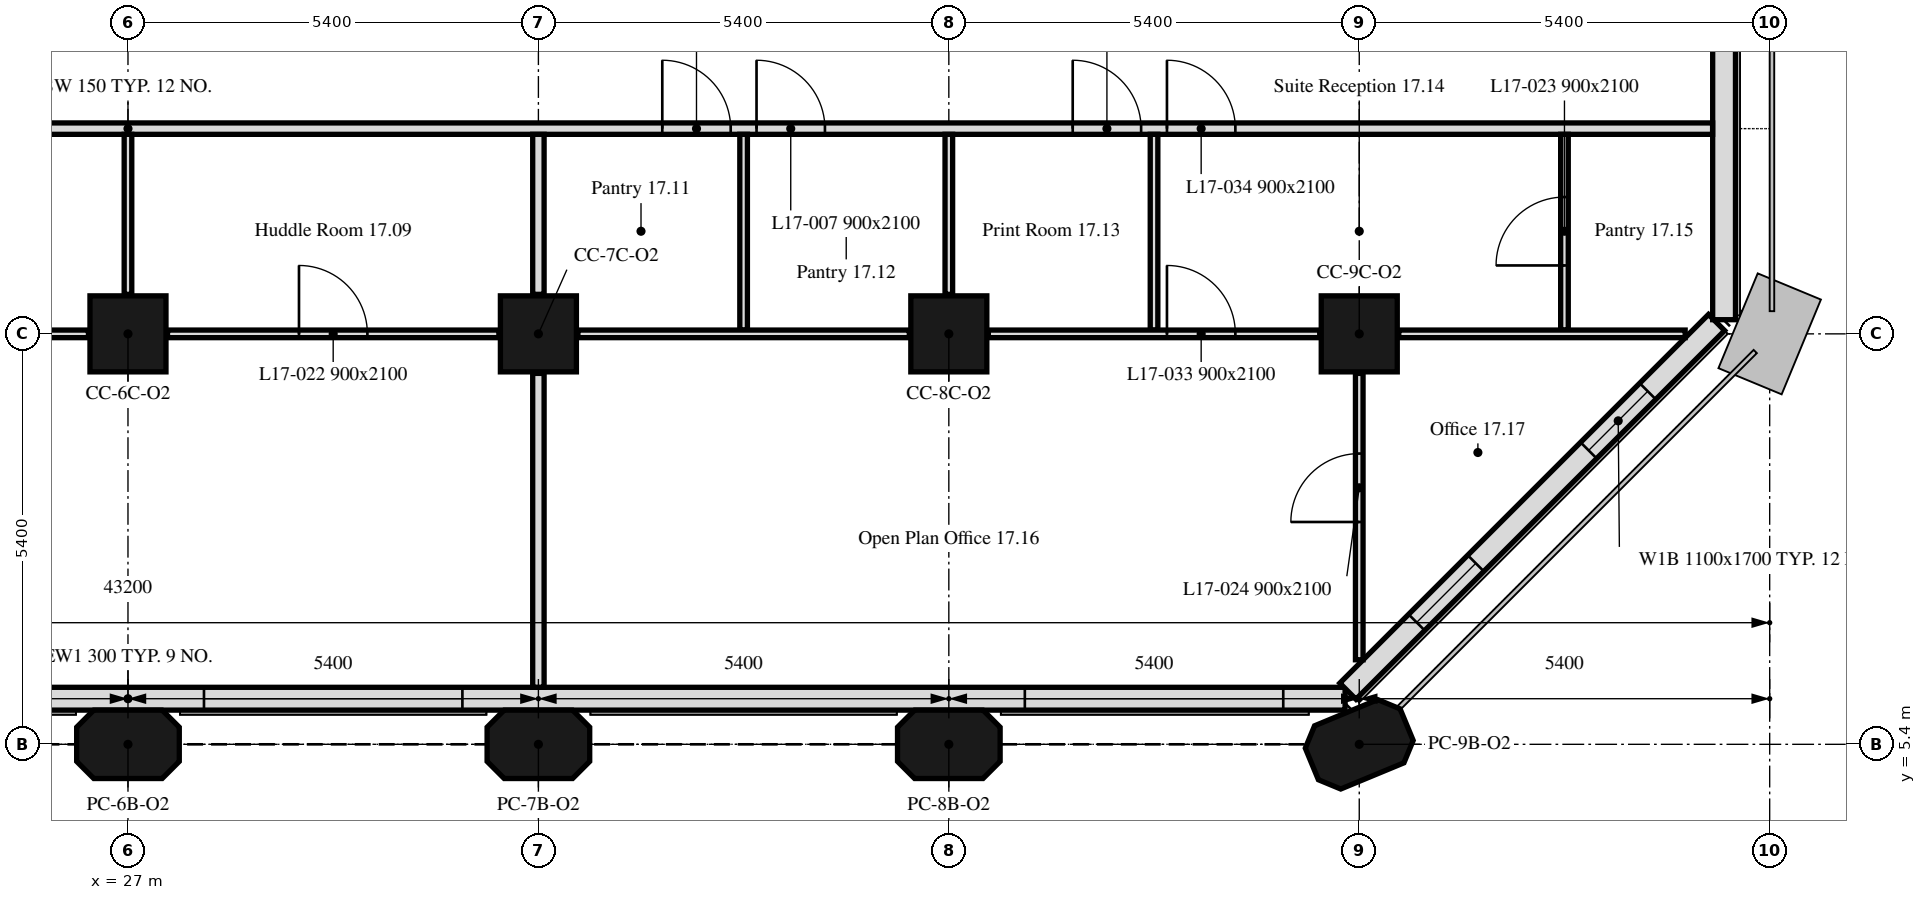
"""IFC4 building model, lengths in metres.
Left out: names, types, materials, properties, quantities, classifications, styles, units other than length and angle.
Written with IfcOpenShell. Run it as: python <this file> out.ifc"""

import sys

from ifc_helpers import new_model, si_unit, direction, frame, frame_2d, origin, origin_2d, place, context, subcontext, project, spatial, polyline, rectangle, outline, extrude, element, fill, save


model = new_model("IFC4")
c1 = context("Model", 3, precision=1e-05, world=origin(), true_north=direction((0.0, 1.0)))
c2 = subcontext(c1, "Body", "Model", "MODEL_VIEW")
j1 = project(units=[si_unit("LENGTHUNIT", "METRE"), si_unit("PLANEANGLEUNIT", "RADIAN")], contexts=[c1])
p1 = place(None, origin())
s1 = spatial("IfcSite", under=j1, at=p1, CompositionType="ELEMENT")
p2 = place(p1, origin())
s2 = spatial("IfcBuilding", under=s1, at=p2, CompositionType="ELEMENT")
p3 = place(p2, frame((0.0, 0.0, 76.4)))
s3 = spatial("IfcBuildingStorey", under=s2, at=p3, CompositionType="ELEMENT", Elevation=76.4)
for number, where, z_axis, x_axis in (
    (1, (27.0, 5.4, 0.0), (0.0, 0.0, 1.0), (1.0, 0.0, 0.0)),
    (2, (32.4, 5.4, 0.0), (0.0, 0.0, 1.0), (1.0, 0.0, 0.0)),
    (3, (37.8, 5.4, 0.0), (0.0, 0.0, 1.0), (1.0, 0.0, 0.0)),
    (4, (43.2, 5.4, 0.0), (0.0, 0.0, 1.0), (0.924, 0.383, 0.0)),
):
    element("IfcColumn", number, at=place(p3, frame(where, z_axis=z_axis, x_axis=x_axis)), inside=s3, PredefinedType="COLUMN", context=c2, shape_type="SweptSolid", body=[
        extrude(outline(polyline([(-0.45, -0.45), (0.45, -0.45), (0.675, -0.225), (0.675, 0.225), (0.45, 0.45), (-0.45, 0.45), (-0.675, 0.225), (-0.675, -0.225), (-0.45, -0.45)])), origin(), (0.0, 0.0, 1.0), 3.5),
    ])
for number, where, z_axis, x_axis in (
    (5, (27.0, 10.8, 0.0), (0.0, 0.0, 1.0), (1.0, 0.0, 0.0)),
    (6, (32.4, 10.8, 0.0), (0.0, 0.0, 1.0), (1.0, 0.0, 0.0)),
    (7, (37.8, 10.8, 0.0), (0.0, 0.0, 1.0), (1.0, 0.0, 0.0)),
    (8, (43.2, 10.8, 0.0), (0.0, 0.0, 1.0), (1.0, 0.0, 0.0)),
):
    element("IfcColumn", number, at=place(p3, frame(where, z_axis=z_axis, x_axis=x_axis)), inside=s3, PredefinedType="COLUMN", context=c2, shape_type="SweptSolid", body=[
        extrude(rectangle(XDim=1.0, YDim=1.0, at=origin_2d()), origin(), (0.0, 0.0, 1.0), 3.5),
    ])
p4 = place(p3, frame((10.986, 6.0, 0.0), z_axis=(0.0, 0.0, 1.0), x_axis=(1.0, 0.0, 0.0)))
e9 = element("IfcWall", 9, at=p4, inside=s3, PredefinedType="SOLIDWALL", context=c2, shape_type="SweptSolid", body=[
    extrude(rectangle(XDim=32.027, YDim=0.3, at=frame_2d((16.014, 0.0))), origin(), (0.0, 0.0, 1.0), 3.5),
])
p5 = place(p4, frame((6.214, 0.0, 0.9)))
e10 = element("IfcOpeningElement", 10, at=p5, cuts=e9, PredefinedType="OPENING", context=c2, shape_type="SweptSolid", body=[
    extrude(rectangle(XDim=3.4, YDim=1.7, at=frame_2d((1.7, 0.85))), frame((0.0, 0.16, 0.0), z_axis=(0.0, -1.0, 0.0), x_axis=(1.0, 0.0, 0.0)), (0.0, 0.0, 1.0), 0.32),
])
p6 = place(p4, frame((17.014, 0.0, 0.9)))
e11 = element("IfcOpeningElement", 11, at=p6, cuts=e9, PredefinedType="OPENING", context=c2, shape_type="SweptSolid", body=[
    extrude(rectangle(XDim=3.4, YDim=1.7, at=frame_2d((1.7, 0.85))), frame((0.0, 0.16, 0.0), z_axis=(0.0, -1.0, 0.0), x_axis=(1.0, 0.0, 0.0)), (0.0, 0.0, 1.0), 0.32),
])
p7 = place(p4, frame((27.814, 0.0, 0.9)))
e12 = element("IfcOpeningElement", 12, at=p7, cuts=e9, PredefinedType="OPENING", context=c2, shape_type="SweptSolid", body=[
    extrude(rectangle(XDim=3.4, YDim=1.7, at=frame_2d((1.7, 0.85))), frame((0.0, 0.16, 0.0), z_axis=(0.0, -1.0, 0.0), x_axis=(1.0, 0.0, 0.0)), (0.0, 0.0, 1.0), 0.32),
])
p8 = place(p3, frame((43.051, 6.099, 0.0), z_axis=(0.0, 0.0, 1.0), x_axis=(0.707106781187, 0.707106781187, 0.0)))
e13 = element("IfcWall", 13, at=p8, inside=s3, PredefinedType="SOLIDWALL", context=c2, shape_type="SweptSolid", body=[
    extrude(rectangle(XDim=6.86, YDim=0.3, at=frame_2d((3.43, 0.0))), origin(), (0.0, 0.0, 1.0), 3.5),
])
p9 = place(p8, frame((1.28, 0.0, 0.9)))
e14 = element("IfcOpeningElement", 14, at=p9, cuts=e13, PredefinedType="OPENING", context=c2, shape_type="SweptSolid", body=[
    extrude(rectangle(XDim=1.1, YDim=1.7, at=frame_2d((0.55, 0.85))), frame((0.0, 0.16, 0.0), z_axis=(0.0, -1.0, 0.0), x_axis=(1.0, 0.0, 0.0)), (0.0, 0.0, 1.0), 0.32),
])
p10 = place(p8, frame((4.48, 0.0, 0.9)))
e15 = element("IfcOpeningElement", 15, at=p10, cuts=e13, PredefinedType="OPENING", context=c2, shape_type="SweptSolid", body=[
    extrude(rectangle(XDim=1.1, YDim=1.7, at=frame_2d((0.55, 0.85))), frame((0.0, 0.16, 0.0), z_axis=(0.0, -1.0, 0.0), x_axis=(1.0, 0.0, 0.0)), (0.0, 0.0, 1.0), 0.32),
])
p11 = place(p3, frame((48.0, 10.986, 0.0), z_axis=(0.0, 0.0, 1.0), x_axis=(0.0, 1.0, 0.0)))
e16 = element("IfcWall", 16, at=p11, inside=s3, PredefinedType="SOLIDWALL", context=c2, shape_type="SweptSolid", body=[
    extrude(rectangle(XDim=32.027, YDim=0.3, at=frame_2d((16.014, 0.0))), origin(), (0.0, 0.0, 1.0), 3.5),
])
p12 = place(p11, frame((6.214, 0.0, 0.9)))
e17 = element("IfcOpeningElement", 17, at=p12, cuts=e16, PredefinedType="OPENING", context=c2, shape_type="SweptSolid", body=[
    extrude(rectangle(XDim=3.4, YDim=1.7, at=frame_2d((1.7, 0.85))), frame((0.0, 0.16, 0.0), z_axis=(0.0, -1.0, 0.0), x_axis=(1.0, 0.0, 0.0)), (0.0, 0.0, 1.0), 0.32),
])
p13 = place(p11, frame((17.014, 0.0, 0.9)))
e18 = element("IfcOpeningElement", 18, at=p13, cuts=e16, PredefinedType="OPENING", context=c2, shape_type="SweptSolid", body=[
    extrude(rectangle(XDim=3.4, YDim=1.7, at=frame_2d((1.7, 0.85))), frame((0.0, 0.16, 0.0), z_axis=(0.0, -1.0, 0.0), x_axis=(1.0, 0.0, 0.0)), (0.0, 0.0, 1.0), 0.32),
])
p14 = place(p11, frame((27.814, 0.0, 0.9)))
e19 = element("IfcOpeningElement", 19, at=p14, cuts=e16, PredefinedType="OPENING", context=c2, shape_type="SweptSolid", body=[
    extrude(rectangle(XDim=3.4, YDim=1.7, at=frame_2d((1.7, 0.85))), frame((0.0, 0.16, 0.0), z_axis=(0.0, -1.0, 0.0), x_axis=(1.0, 0.0, 0.0)), (0.0, 0.0, 1.0), 0.32),
])
p15 = place(p3, frame((6.151, 13.5, 0.0), z_axis=(0.0, 0.0, 1.0), x_axis=(1.0, 0.0, 0.0)))
e20 = element("IfcWall", 20, at=p15, inside=s3, PredefinedType="PARTITIONING", context=c2, shape_type="SweptSolid", body=[
    extrude(rectangle(XDim=41.698, YDim=0.15, at=frame_2d((20.849, 0.0))), origin(), (0.0, 0.0, 1.0), 3.5),
])
p16 = place(p15, frame((11.679, 0.0, 0.0)))
e21 = element("IfcOpeningElement", 21, at=p16, cuts=e20, PredefinedType="OPENING", context=c2, shape_type="SweptSolid", body=[
    extrude(rectangle(XDim=0.9, YDim=2.1, at=frame_2d((0.45, 1.05))), frame((0.0, 0.075, 0.0), z_axis=(0.0, -1.0, 0.0), x_axis=(1.0, 0.0, 0.0)), (0.0, 0.0, 1.0), 0.15),
])
p17 = place(p15, frame((27.879, 0.0, 0.0)))
e22 = element("IfcOpeningElement", 22, at=p17, cuts=e20, PredefinedType="OPENING", context=c2, shape_type="SweptSolid", body=[
    extrude(rectangle(XDim=0.9, YDim=2.1, at=frame_2d((0.45, 1.05))), frame((0.0, 0.075, 0.0), z_axis=(0.0, -1.0, 0.0), x_axis=(1.0, 0.0, 0.0)), (0.0, 0.0, 1.0), 0.15),
])
p18 = place(p15, frame((29.119, 0.0, 0.0)))
e23 = element("IfcOpeningElement", 23, at=p18, cuts=e20, PredefinedType="OPENING", context=c2, shape_type="SweptSolid", body=[
    extrude(rectangle(XDim=0.9, YDim=2.1, at=frame_2d((0.45, 1.05))), frame((0.0, 0.075, 0.0), z_axis=(0.0, -1.0, 0.0), x_axis=(1.0, 0.0, 0.0)), (0.0, 0.0, 1.0), 0.15),
])
p19 = place(p15, frame((33.279, 0.0, 0.0)))
e24 = element("IfcOpeningElement", 24, at=p19, cuts=e20, PredefinedType="OPENING", context=c2, shape_type="SweptSolid", body=[
    extrude(rectangle(XDim=0.9, YDim=2.1, at=frame_2d((0.45, 1.05))), frame((0.0, 0.075, 0.0), z_axis=(0.0, -1.0, 0.0), x_axis=(1.0, 0.0, 0.0)), (0.0, 0.0, 1.0), 0.15),
])
p20 = place(p15, frame((2.174, 0.0, 0.0)))
e25 = element("IfcOpeningElement", 25, at=p20, cuts=e20, PredefinedType="OPENING", context=c2, shape_type="SweptSolid", body=[
    extrude(rectangle(XDim=0.9, YDim=2.1, at=frame_2d((0.45, 1.05))), frame((0.0, 0.075, 0.0), z_axis=(0.0, -1.0, 0.0), x_axis=(1.0, 0.0, 0.0)), (0.0, 0.0, 1.0), 0.15),
])
p21 = place(p15, frame((34.519, 0.0, 0.0)))
e26 = element("IfcOpeningElement", 26, at=p21, cuts=e20, PredefinedType="OPENING", context=c2, shape_type="SweptSolid", body=[
    extrude(rectangle(XDim=0.9, YDim=2.1, at=frame_2d((0.45, 1.05))), frame((0.0, 0.075, 0.0), z_axis=(0.0, -1.0, 0.0), x_axis=(1.0, 0.0, 0.0)), (0.0, 0.0, 1.0), 0.15),
])
p22 = place(p3, frame((22.12, 10.8, 0.0), z_axis=(0.0, 0.0, 1.0), x_axis=(1.0, 0.0, 0.0)))
e27 = element("IfcWall", 27, at=p22, inside=s3, PredefinedType="PARTITIONING", context=c2, shape_type="SweptSolid", body=[
    extrude(rectangle(XDim=4.36, YDim=0.1, at=frame_2d((2.18, 0.0))), origin(), (0.0, 0.0, 1.0), 3.5),
])
p23 = place(p22, frame((1.73, 0.0, 0.0)))
e28 = element("IfcOpeningElement", 28, at=p23, cuts=e27, PredefinedType="OPENING", context=c2, shape_type="SweptSolid", body=[
    extrude(rectangle(XDim=0.9, YDim=2.1, at=frame_2d((0.45, 1.05))), frame((0.0, 0.05, 0.0), z_axis=(0.0, -1.0, 0.0), x_axis=(1.0, 0.0, 0.0)), (0.0, 0.0, 1.0), 0.1),
])
p24 = place(p3, frame((27.0, 11.32, 0.0), z_axis=(0.0, 0.0, 1.0), x_axis=(0.0, 1.0, 0.0)))
e29 = element("IfcWall", 29, at=p24, inside=s3, PredefinedType="PARTITIONING", context=c2, shape_type="SweptSolid", body=[
    extrude(rectangle(XDim=2.105, YDim=0.1, at=frame_2d((1.052, 0.0))), origin(), (0.0, 0.0, 1.0), 3.5),
])
p25 = place(p3, frame((27.52, 10.8, 0.0), z_axis=(0.0, 0.0, 1.0), x_axis=(1.0, 0.0, 0.0)))
e30 = element("IfcWall", 30, at=p25, inside=s3, PredefinedType="PARTITIONING", context=c2, shape_type="SweptSolid", body=[
    extrude(rectangle(XDim=4.36, YDim=0.1, at=frame_2d((2.18, 0.0))), origin(), (0.0, 0.0, 1.0), 3.5),
])
p26 = place(p25, frame((1.73, 0.0, 0.0)))
e31 = element("IfcOpeningElement", 31, at=p26, cuts=e30, PredefinedType="OPENING", context=c2, shape_type="SweptSolid", body=[
    extrude(rectangle(XDim=0.9, YDim=2.1, at=frame_2d((0.45, 1.05))), frame((0.0, 0.05, 0.0), z_axis=(0.0, -1.0, 0.0), x_axis=(1.0, 0.0, 0.0)), (0.0, 0.0, 1.0), 0.1),
])
p27 = place(p3, frame((32.4, 11.32, 0.0), z_axis=(0.0, 0.0, 1.0), x_axis=(0.0, 1.0, 0.0)))
e32 = element("IfcWall", 32, at=p27, inside=s3, PredefinedType="PARTITIONING", context=c2, shape_type="SweptSolid", body=[
    extrude(rectangle(XDim=2.105, YDim=0.15, at=frame_2d((1.052, 0.0))), origin(), (0.0, 0.0, 1.0), 3.5),
])
p28 = place(p3, frame((32.4, 6.151, 0.0), z_axis=(0.0, 0.0, 1.0), x_axis=(0.0, 1.0, 0.0)))
e33 = element("IfcWall", 33, at=p28, inside=s3, PredefinedType="PARTITIONING", context=c2, shape_type="SweptSolid", body=[
    extrude(rectangle(XDim=4.129, YDim=0.15, at=frame_2d((2.064, 0.0))), origin(), (0.0, 0.0, 1.0), 3.5),
])
p29 = place(p3, frame((35.1, 10.85, 0.0), z_axis=(0.0, 0.0, 1.0), x_axis=(0.0, 1.0, 0.0)))
e34 = element("IfcWall", 34, at=p29, inside=s3, PredefinedType="PARTITIONING", context=c2, shape_type="SweptSolid", body=[
    extrude(rectangle(XDim=2.575, YDim=0.1, at=frame_2d((1.288, 0.0))), origin(), (0.0, 0.0, 1.0), 3.5),
])
p30 = place(p3, frame((32.92, 10.8, 0.0), z_axis=(0.0, 0.0, 1.0), x_axis=(1.0, 0.0, 0.0)))
e35 = element("IfcWall", 35, at=p30, inside=s3, PredefinedType="PARTITIONING", context=c2, shape_type="SweptSolid", body=[
    extrude(rectangle(XDim=4.36, YDim=0.1, at=frame_2d((2.18, 0.0))), origin(), (0.0, 0.0, 1.0), 3.5),
])
p31 = place(p3, frame((37.8, 11.32, 0.0), z_axis=(0.0, 0.0, 1.0), x_axis=(0.0, 1.0, 0.0)))
e36 = element("IfcWall", 36, at=p31, inside=s3, PredefinedType="PARTITIONING", context=c2, shape_type="SweptSolid", body=[
    extrude(rectangle(XDim=2.105, YDim=0.1, at=frame_2d((1.052, 0.0))), origin(), (0.0, 0.0, 1.0), 3.5),
])
p32 = place(p3, frame((40.5, 10.85, 0.0), z_axis=(0.0, 0.0, 1.0), x_axis=(0.0, 1.0, 0.0)))
e37 = element("IfcWall", 37, at=p32, inside=s3, PredefinedType="PARTITIONING", context=c2, shape_type="SweptSolid", body=[
    extrude(rectangle(XDim=2.575, YDim=0.1, at=frame_2d((1.288, 0.0))), origin(), (0.0, 0.0, 1.0), 3.5),
])
p33 = place(p3, frame((38.32, 10.8, 0.0), z_axis=(0.0, 0.0, 1.0), x_axis=(1.0, 0.0, 0.0)))
e38 = element("IfcWall", 38, at=p33, inside=s3, PredefinedType="PARTITIONING", context=c2, shape_type="SweptSolid", body=[
    extrude(rectangle(XDim=4.36, YDim=0.1, at=frame_2d((2.18, 0.0))), origin(), (0.0, 0.0, 1.0), 3.5),
])
p34 = place(p33, frame((2.35, 0.0, 0.0)))
e39 = element("IfcOpeningElement", 39, at=p34, cuts=e38, PredefinedType="OPENING", context=c2, shape_type="SweptSolid", body=[
    extrude(rectangle(XDim=0.9, YDim=2.1, at=frame_2d((0.45, 1.05))), frame((0.0, 0.05, 0.0), z_axis=(0.0, -1.0, 0.0), x_axis=(1.0, 0.0, 0.0)), (0.0, 0.0, 1.0), 0.1),
])
p35 = place(p3, frame((45.9, 10.85, 0.0), z_axis=(0.0, 0.0, 1.0), x_axis=(0.0, 1.0, 0.0)))
e40 = element("IfcWall", 40, at=p35, inside=s3, PredefinedType="PARTITIONING", context=c2, shape_type="SweptSolid", body=[
    extrude(rectangle(XDim=2.575, YDim=0.1, at=frame_2d((1.288, 0.0))), origin(), (0.0, 0.0, 1.0), 3.5),
])
p36 = place(p35, frame((0.85, 0.0, 0.0)))
e41 = element("IfcOpeningElement", 41, at=p36, cuts=e40, PredefinedType="OPENING", context=c2, shape_type="SweptSolid", body=[
    extrude(rectangle(XDim=0.9, YDim=2.1, at=frame_2d((0.45, 1.05))), frame((0.0, 0.05, 0.0), z_axis=(0.0, -1.0, 0.0), x_axis=(1.0, 0.0, 0.0)), (0.0, 0.0, 1.0), 0.1),
])
p37 = place(p3, frame((43.72, 10.8, 0.0), z_axis=(0.0, 0.0, 1.0), x_axis=(1.0, 0.0, 0.0)))
e42 = element("IfcWall", 42, at=p37, inside=s3, PredefinedType="PARTITIONING", context=c2, shape_type="SweptSolid", body=[
    extrude(rectangle(XDim=3.768, YDim=0.1, at=frame_2d((1.884, 0.0))), origin(), (0.0, 0.0, 1.0), 3.5),
])
p38 = place(p3, frame((43.2, 6.512, 0.0), z_axis=(0.0, 0.0, 1.0), x_axis=(0.0, 1.0, 0.0)))
e43 = element("IfcWall", 43, at=p38, inside=s3, PredefinedType="PARTITIONING", context=c2, shape_type="SweptSolid", body=[
    extrude(rectangle(XDim=3.768, YDim=0.1, at=frame_2d((1.884, 0.0))), origin(), (0.0, 0.0, 1.0), 3.5),
])
p39 = place(p38, frame((1.813, 0.0, 0.0)))
e44 = element("IfcOpeningElement", 44, at=p39, cuts=e43, PredefinedType="OPENING", context=c2, shape_type="SweptSolid", body=[
    extrude(rectangle(XDim=0.9, YDim=2.1, at=frame_2d((0.45, 1.05))), frame((0.0, 0.05, 0.0), z_axis=(0.0, -1.0, 0.0), x_axis=(1.0, 0.0, 0.0)), (0.0, 0.0, 1.0), 0.1),
])
p40 = place(p6, origin())
e45 = element("IfcWindow", 45, at=p40, inside=s3, PartitioningType="SINGLE_PANEL", PredefinedType="WINDOW", context=c2, shape_type="SweptSolid", body=[
    extrude(rectangle(XDim=3.4, YDim=1.7, at=frame_2d((1.7, 0.85))), frame((0.0, 0.03, 0.0), z_axis=(0.0, -1.0, 0.0), x_axis=(1.0, 0.0, 0.0)), (0.0, 0.0, 1.0), 0.06),
])
fill(e11, e45)
p41 = place(p7, origin())
e46 = element("IfcWindow", 46, at=p41, inside=s3, PartitioningType="SINGLE_PANEL", PredefinedType="WINDOW", context=c2, shape_type="SweptSolid", body=[
    extrude(rectangle(XDim=3.4, YDim=1.7, at=frame_2d((1.7, 0.85))), frame((0.0, 0.03, 0.0), z_axis=(0.0, -1.0, 0.0), x_axis=(1.0, 0.0, 0.0)), (0.0, 0.0, 1.0), 0.06),
])
fill(e12, e46)
p42 = place(p9, origin())
e47 = element("IfcWindow", 47, at=p42, inside=s3, PartitioningType="SINGLE_PANEL", PredefinedType="WINDOW", context=c2, shape_type="SweptSolid", body=[
    extrude(rectangle(XDim=1.1, YDim=1.7, at=frame_2d((0.55, 0.85))), frame((0.0, 0.03, 0.0), z_axis=(0.0, -1.0, 0.0), x_axis=(1.0, 0.0, 0.0)), (0.0, 0.0, 1.0), 0.06),
])
fill(e14, e47)
p43 = place(p10, origin())
e48 = element("IfcWindow", 48, at=p43, inside=s3, PartitioningType="SINGLE_PANEL", PredefinedType="WINDOW", context=c2, shape_type="SweptSolid", body=[
    extrude(rectangle(XDim=1.1, YDim=1.7, at=frame_2d((0.55, 0.85))), frame((0.0, 0.03, 0.0), z_axis=(0.0, -1.0, 0.0), x_axis=(1.0, 0.0, 0.0)), (0.0, 0.0, 1.0), 0.06),
])
fill(e15, e48)
p44 = place(p17, origin())
e49 = element("IfcDoor", 49, at=p44, inside=s3, OperationType="SINGLE_SWING_RIGHT", PredefinedType="DOOR", context=c2, shape_type="SweptSolid", body=[
    extrude(rectangle(XDim=0.9, YDim=2.1, at=frame_2d((0.45, 1.05))), frame((0.0, 0.025, 0.0), z_axis=(0.0, -1.0, 0.0), x_axis=(1.0, 0.0, 0.0)), (0.0, 0.0, 1.0), 0.05),
])
fill(e22, e49)
p45 = place(p18, origin())
e50 = element("IfcDoor", 50, at=p45, inside=s3, OperationType="SINGLE_SWING_RIGHT", PredefinedType="DOOR", context=c2, shape_type="SweptSolid", body=[
    extrude(rectangle(XDim=0.9, YDim=2.1, at=frame_2d((0.45, 1.05))), frame((0.0, 0.025, 0.0), z_axis=(0.0, -1.0, 0.0), x_axis=(1.0, 0.0, 0.0)), (0.0, 0.0, 1.0), 0.05),
])
fill(e23, e50)
p46 = place(p19, origin())
e51 = element("IfcDoor", 51, at=p46, inside=s3, OperationType="SINGLE_SWING_RIGHT", PredefinedType="DOOR", context=c2, shape_type="SweptSolid", body=[
    extrude(rectangle(XDim=0.9, YDim=2.1, at=frame_2d((0.45, 1.05))), frame((0.0, 0.025, 0.0), z_axis=(0.0, -1.0, 0.0), x_axis=(1.0, 0.0, 0.0)), (0.0, 0.0, 1.0), 0.05),
])
fill(e24, e51)
p47 = place(p26, origin())
e52 = element("IfcDoor", 52, at=p47, inside=s3, OperationType="SINGLE_SWING_RIGHT", PredefinedType="DOOR", context=c2, shape_type="SweptSolid", body=[
    extrude(rectangle(XDim=0.9, YDim=2.1, at=frame_2d((0.45, 1.05))), frame((0.0, 0.025, 0.0), z_axis=(0.0, -1.0, 0.0), x_axis=(1.0, 0.0, 0.0)), (0.0, 0.0, 1.0), 0.05),
])
fill(e31, e52)
p48 = place(p36, origin())
e53 = element("IfcDoor", 53, at=p48, inside=s3, OperationType="SINGLE_SWING_LEFT", PredefinedType="DOOR", context=c2, shape_type="SweptSolid", body=[
    extrude(rectangle(XDim=0.9, YDim=2.1, at=frame_2d((0.45, 1.05))), frame((0.0, 0.025, 0.0), z_axis=(0.0, -1.0, 0.0), x_axis=(1.0, 0.0, 0.0)), (0.0, 0.0, 1.0), 0.05),
])
fill(e41, e53)
p49 = place(p39, origin())
e54 = element("IfcDoor", 54, at=p49, inside=s3, OperationType="SINGLE_SWING_LEFT", PredefinedType="DOOR", context=c2, shape_type="SweptSolid", body=[
    extrude(rectangle(XDim=0.9, YDim=2.1, at=frame_2d((0.45, 1.05))), frame((0.0, 0.025, 0.0), z_axis=(0.0, -1.0, 0.0), x_axis=(1.0, 0.0, 0.0)), (0.0, 0.0, 1.0), 0.05),
])
fill(e44, e54)
p50 = place(p34, origin())
e55 = element("IfcDoor", 55, at=p50, inside=s3, OperationType="SINGLE_SWING_LEFT", PredefinedType="DOOR", context=c2, shape_type="SweptSolid", body=[
    extrude(rectangle(XDim=0.9, YDim=2.1, at=frame_2d((0.45, 1.05))), frame((0.0, 0.025, 0.0), z_axis=(0.0, -1.0, 0.0), x_axis=(1.0, 0.0, 0.0)), (0.0, 0.0, 1.0), 0.05),
])
fill(e39, e55)
p51 = place(p21, origin())
e56 = element("IfcDoor", 56, at=p51, inside=s3, OperationType="SINGLE_SWING_RIGHT", PredefinedType="DOOR", context=c2, shape_type="SweptSolid", body=[
    extrude(rectangle(XDim=0.9, YDim=2.1, at=frame_2d((0.45, 1.05))), frame((0.0, 0.025, 0.0), z_axis=(0.0, -1.0, 0.0), x_axis=(1.0, 0.0, 0.0)), (0.0, 0.0, 1.0), 0.05),
])
fill(e26, e56)
save(model, sys.argv[1])
